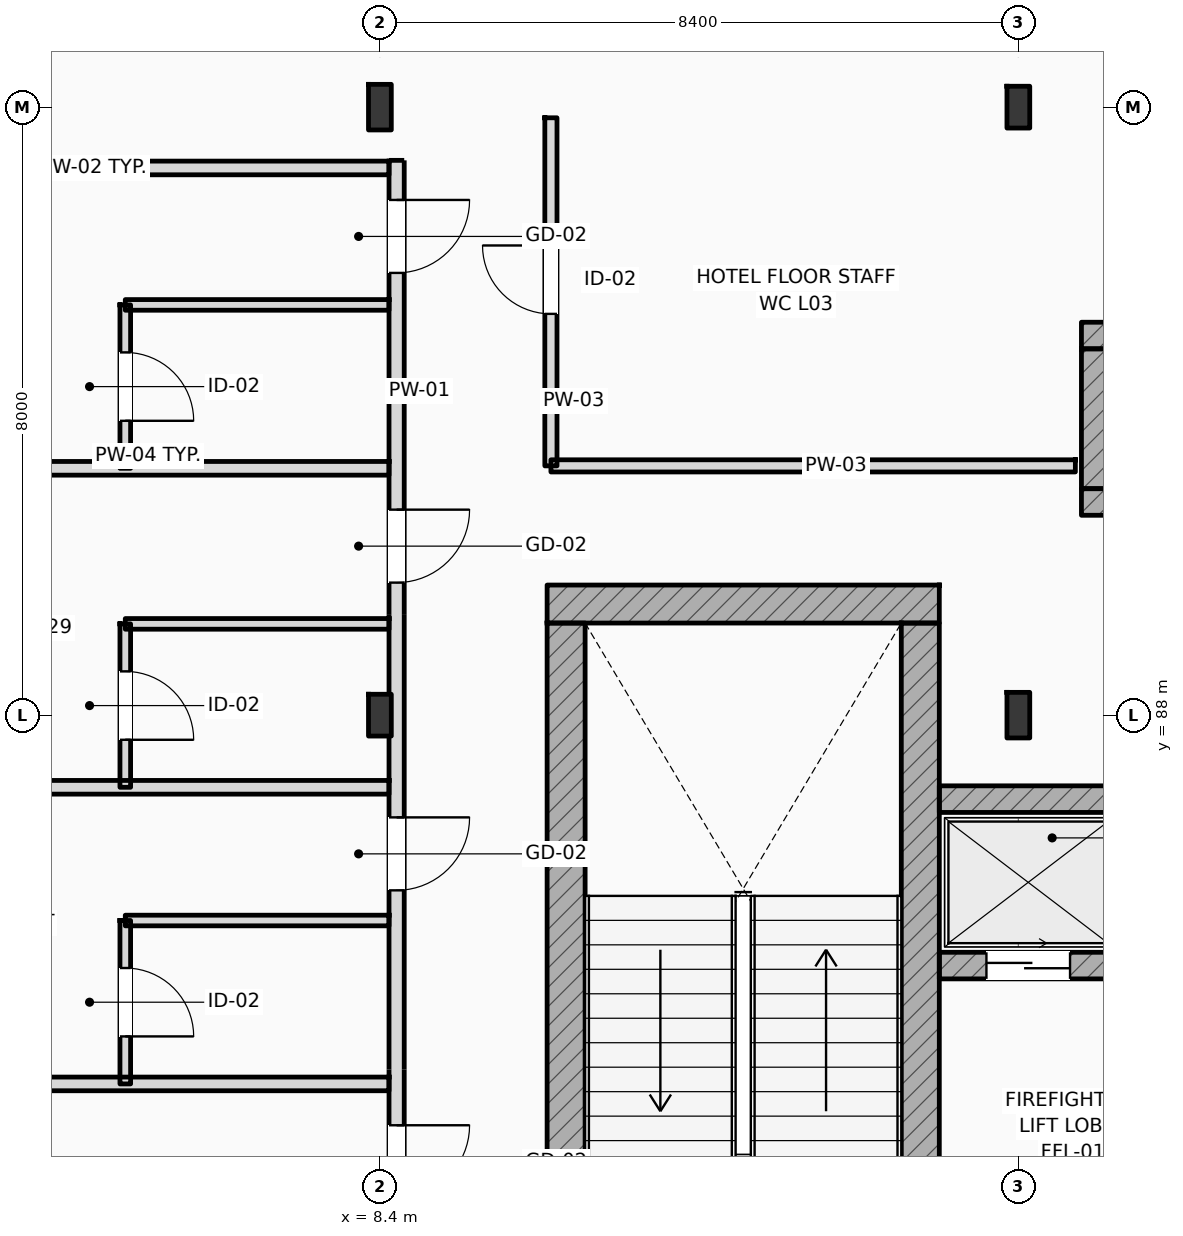
"""IFC4 building model, lengths in metres.
Left out: names, types, materials, properties, quantities, classifications, styles, units other than length and angle.
Written with IfcOpenShell. Run it as: python <this file> out.ifc"""

import sys

from ifc_helpers import new_model, si_unit, direction, frame, frame_2d, origin, origin_2d, place, context, subcontext, project, spatial, rectangle, i_section, extrude, element, fill, save


model = new_model("IFC4")
c1 = context("Model", 3, precision=1e-05, world=origin(), true_north=direction((0.0, 1.0)))
c2 = subcontext(c1, "Body", "Model", "MODEL_VIEW")
j1 = project(units=[si_unit("LENGTHUNIT", "METRE"), si_unit("PLANEANGLEUNIT", "RADIAN")], contexts=[c1])
p1 = place(None, origin())
s1 = spatial("IfcSite", under=j1, at=p1, CompositionType="ELEMENT")
p2 = place(p1, origin())
s2 = spatial("IfcBuilding", under=s1, at=p2, CompositionType="ELEMENT")
p3 = place(p2, frame((0.0, 0.0, 16.2)))
s3 = spatial("IfcBuildingStorey", under=s2, at=p3, CompositionType="ELEMENT", Elevation=16.2)
p4 = place(p3, frame((8.4, 88.0, 0.0), z_axis=(0.0, 0.0, 1.0), x_axis=(1.0, 0.0, 0.0)))
e1 = element("IfcColumn", 1, at=p4, inside=s3, PredefinedType="COLUMN", context=c2, shape_type="SweptSolid", body=[
    extrude(i_section(OverallWidth=0.3, OverallDepth=0.55, WebThickness=0.015, FlangeThickness=0.029, FilletRadius=0.027, at=origin_2d()), origin(), (0.0, 0.0, 1.0), 4.2),
])
for number, where, z_axis, x_axis in (
    (2, (8.4, 96.0, 0.0), (0.0, 0.0, 1.0), (1.0, 0.0, 0.0)),
    (3, (16.8, 88.0, 0.0), (0.0, 0.0, 1.0), (1.0, 0.0, 0.0)),
):
    element("IfcColumn", number, at=place(p3, frame(where, z_axis=z_axis, x_axis=x_axis)), inside=s3, PredefinedType="COLUMN", context=c2, shape_type="SweptSolid", body=[
        extrude(i_section(OverallWidth=0.3, OverallDepth=0.6, WebThickness=0.015, FlangeThickness=0.03, FilletRadius=0.027, at=origin_2d()), origin(), (0.0, 0.0, 1.0), 4.2),
    ])
p5 = place(p3, frame((16.8, 96.0, 0.0), z_axis=(0.0, 0.0, 1.0), x_axis=(1.0, 0.0, 0.0)))
e4 = element("IfcColumn", 4, at=p5, inside=s3, PredefinedType="COLUMN", context=c2, shape_type="SweptSolid", body=[
    extrude(i_section(OverallWidth=0.3, OverallDepth=0.55, WebThickness=0.015, FlangeThickness=0.029, FilletRadius=0.027, at=origin_2d()), origin(), (0.0, 0.0, 1.0), 4.2),
])
p6 = place(p3, frame((10.6, 89.462, 0.0), z_axis=(0.0, 0.0, 1.0), x_axis=(1.0, 0.0, 0.0)))
e5 = element("IfcWall", 5, at=p6, inside=s3, PredefinedType="SHEAR", context=c2, shape_type="SweptSolid", body=[
    extrude(rectangle(XDim=5.16, YDim=0.5, at=frame_2d((2.58, 0.0))), origin(), (0.0, 0.0, 1.0), 4.2),
])
p7 = place(p3, frame((10.85, 80.1, 0.0), z_axis=(0.0, 0.0, 1.0), x_axis=(0.0, 1.0, 0.0)))
e6 = element("IfcWall", 6, at=p7, inside=s3, PredefinedType="SHEAR", context=c2, shape_type="SweptSolid", body=[
    extrude(rectangle(XDim=9.112, YDim=0.5, at=frame_2d((4.556, 0.0))), origin(), (0.0, 0.0, 1.0), 4.2),
])
p8 = place(p3, frame((15.51, 80.1, 0.0), z_axis=(0.0, 0.0, 1.0), x_axis=(0.0, 1.0, 0.0)))
e7 = element("IfcWall", 7, at=p8, inside=s3, PredefinedType="SHEAR", context=c2, shape_type="SweptSolid", body=[
    extrude(rectangle(XDim=9.112, YDim=0.5, at=frame_2d((4.556, 0.0))), origin(), (0.0, 0.0, 1.0), 4.2),
])
p9 = place(p8, frame((0.44, 0.0, 0.0)))
e8 = element("IfcOpeningElement", 8, at=p9, cuts=e7, PredefinedType="OPENING", context=c2, shape_type="SweptSolid", body=[
    extrude(rectangle(XDim=1.1, YDim=2.2, at=frame_2d((0.55, 1.1))), frame((0.0, 0.26, 0.0), z_axis=(0.0, -1.0, 0.0), x_axis=(1.0, 0.0, 0.0)), (0.0, 0.0, 1.0), 0.52),
])
p10 = place(p3, frame((15.76, 86.895, 0.0), z_axis=(0.0, 0.0, 1.0), x_axis=(1.0, 0.0, 0.0)))
e9 = element("IfcWall", 9, at=p10, inside=s3, PredefinedType="SHEAR", context=c2, shape_type="SweptSolid", body=[
    extrude(rectangle(XDim=2.69, YDim=0.35, at=frame_2d((1.345, 0.0))), origin(), (0.0, 0.0, 1.0), 3.92),
])
p11 = place(p3, frame((15.76, 84.705, 0.0), z_axis=(0.0, 0.0, 1.0), x_axis=(1.0, 0.0, 0.0)))
e10 = element("IfcWall", 10, at=p11, inside=s3, PredefinedType="SHEAR", context=c2, shape_type="SweptSolid", body=[
    extrude(rectangle(XDim=2.69, YDim=0.35, at=frame_2d((1.345, 0.0))), origin(), (0.0, 0.0, 1.0), 3.92),
])
p12 = place(p11, frame((0.62, 0.0, 0.0)))
e11 = element("IfcOpeningElement", 11, at=p12, cuts=e10, PredefinedType="OPENING", context=c2, shape_type="SweptSolid", body=[
    extrude(rectangle(XDim=1.1, YDim=2.2, at=frame_2d((0.55, 1.1))), frame((0.0, 0.185, 0.0), z_axis=(0.0, -1.0, 0.0), x_axis=(1.0, 0.0, 0.0)), (0.0, 0.0, 1.0), 0.37),
])
p13 = place(p3, frame((17.63, 92.995, 0.0), z_axis=(0.0, 0.0, 1.0), x_axis=(1.0, 0.0, 0.0)))
e12 = element("IfcWall", 12, at=p13, inside=s3, PredefinedType="SHEAR", context=c2, shape_type="SweptSolid", body=[
    extrude(rectangle(XDim=3.34, YDim=0.35, at=frame_2d((1.67, 0.0))), origin(), (0.0, 0.0, 1.0), 3.92),
])
p14 = place(p3, frame((17.63, 90.805, 0.0), z_axis=(0.0, 0.0, 1.0), x_axis=(1.0, 0.0, 0.0)))
e13 = element("IfcWall", 13, at=p14, inside=s3, PredefinedType="SHEAR", context=c2, shape_type="SweptSolid", body=[
    extrude(rectangle(XDim=3.34, YDim=0.35, at=frame_2d((1.67, 0.0))), origin(), (0.0, 0.0, 1.0), 3.92),
])
p15 = place(p14, frame((1.045, 0.0, 0.0)))
e14 = element("IfcOpeningElement", 14, at=p15, cuts=e13, PredefinedType="OPENING", context=c2, shape_type="SweptSolid", body=[
    extrude(rectangle(XDim=1.25, YDim=2.25, at=frame_2d((0.625, 1.125))), frame((0.0, 0.185, 0.0), z_axis=(0.0, -1.0, 0.0), x_axis=(1.0, 0.0, 0.0)), (0.0, 0.0, 1.0), 0.37),
])
p16 = place(p3, frame((17.805, 90.98, 0.0), z_axis=(0.0, 0.0, 1.0), x_axis=(0.0, 1.0, 0.0)))
e15 = element("IfcWall", 15, at=p16, inside=s3, PredefinedType="SHEAR", context=c2, shape_type="SweptSolid", body=[
    extrude(rectangle(XDim=1.84, YDim=0.35, at=frame_2d((0.92, 0.0))), origin(), (0.0, 0.0, 1.0), 3.92),
])
p17 = place(p3, frame((8.62, 62.64, 0.0), z_axis=(0.0, 0.0, 1.0), x_axis=(0.0, 1.0, 0.0)))
e16 = element("IfcWall", 16, at=p17, inside=s3, PredefinedType="PARTITIONING", context=c2, shape_type="SweptSolid", body=[
    extrude(rectangle(XDim=32.66, YDim=0.2, at=frame_2d((16.33, 0.0))), origin(), (0.0, 0.0, 1.0), 3.51),
])
p18 = place(p17, frame((2.829, 0.0, 0.0)))
e17 = element("IfcOpeningElement", 17, at=p18, cuts=e16, PredefinedType="OPENING", context=c2, shape_type="SweptSolid", body=[
    extrude(rectangle(XDim=0.96, YDim=2.2, at=frame_2d((0.48, 1.1))), frame((0.0, 0.11, 0.0), z_axis=(0.0, -1.0, 0.0), x_axis=(1.0, 0.0, 0.0)), (0.0, 0.0, 1.0), 0.22),
])
p19 = place(p17, frame((4.704, 0.0, 0.0)))
e18 = element("IfcOpeningElement", 18, at=p19, cuts=e16, PredefinedType="OPENING", context=c2, shape_type="SweptSolid", body=[
    extrude(rectangle(XDim=0.96, YDim=2.2, at=frame_2d((0.48, 1.1))), frame((0.0, 0.11, 0.0), z_axis=(0.0, -1.0, 0.0), x_axis=(1.0, 0.0, 0.0)), (0.0, 0.0, 1.0), 0.22),
])
p20 = place(p17, frame((10.905, 0.0, 0.0)))
e19 = element("IfcOpeningElement", 19, at=p20, cuts=e16, PredefinedType="OPENING", context=c2, shape_type="SweptSolid", body=[
    extrude(rectangle(XDim=0.96, YDim=2.2, at=frame_2d((0.48, 1.1))), frame((0.0, 0.11, 0.0), z_axis=(0.0, -1.0, 0.0), x_axis=(1.0, 0.0, 0.0)), (0.0, 0.0, 1.0), 0.22),
])
p21 = place(p17, frame((14.954, 0.0, 0.0)))
e20 = element("IfcOpeningElement", 20, at=p21, cuts=e16, PredefinedType="OPENING", context=c2, shape_type="SweptSolid", body=[
    extrude(rectangle(XDim=0.96, YDim=2.2, at=frame_2d((0.48, 1.1))), frame((0.0, 0.11, 0.0), z_axis=(0.0, -1.0, 0.0), x_axis=(1.0, 0.0, 0.0)), (0.0, 0.0, 1.0), 0.22),
])
p22 = place(p17, frame((19.004, 0.0, 0.0)))
e21 = element("IfcOpeningElement", 21, at=p22, cuts=e16, PredefinedType="OPENING", context=c2, shape_type="SweptSolid", body=[
    extrude(rectangle(XDim=0.96, YDim=2.2, at=frame_2d((0.48, 1.1))), frame((0.0, 0.11, 0.0), z_axis=(0.0, -1.0, 0.0), x_axis=(1.0, 0.0, 0.0)), (0.0, 0.0, 1.0), 0.22),
])
p23 = place(p17, frame((23.055, 0.0, 0.0)))
e22 = element("IfcOpeningElement", 22, at=p23, cuts=e16, PredefinedType="OPENING", context=c2, shape_type="SweptSolid", body=[
    extrude(rectangle(XDim=0.96, YDim=2.2, at=frame_2d((0.48, 1.1))), frame((0.0, 0.11, 0.0), z_axis=(0.0, -1.0, 0.0), x_axis=(1.0, 0.0, 0.0)), (0.0, 0.0, 1.0), 0.22),
])
p24 = place(p17, frame((27.104, 0.0, 0.0)))
e23 = element("IfcOpeningElement", 23, at=p24, cuts=e16, PredefinedType="OPENING", context=c2, shape_type="SweptSolid", body=[
    extrude(rectangle(XDim=0.96, YDim=2.2, at=frame_2d((0.48, 1.1))), frame((0.0, 0.11, 0.0), z_axis=(0.0, -1.0, 0.0), x_axis=(1.0, 0.0, 0.0)), (0.0, 0.0, 1.0), 0.22),
])
p25 = place(p17, frame((31.179, 0.0, 0.0)))
e24 = element("IfcOpeningElement", 24, at=p25, cuts=e16, PredefinedType="OPENING", context=c2, shape_type="SweptSolid", body=[
    extrude(rectangle(XDim=0.96, YDim=2.2, at=frame_2d((0.48, 1.1))), frame((0.0, 0.11, 0.0), z_axis=(0.0, -1.0, 0.0), x_axis=(1.0, 0.0, 0.0)), (0.0, 0.0, 1.0), 0.22),
])
p26 = place(p3, frame((10.65, 91.28, 0.0), z_axis=(0.0, 0.0, 1.0), x_axis=(0.0, 1.0, 0.0)))
e25 = element("IfcWall", 25, at=p26, inside=s3, PredefinedType="PARTITIONING", context=c2, shape_type="SweptSolid", body=[
    extrude(rectangle(XDim=4.58, YDim=0.16, at=frame_2d((2.29, 0.0))), origin(), (0.0, 0.0, 1.0), 3.92),
])
p27 = place(p26, frame((2.0, 0.0, 0.0)))
e26 = element("IfcOpeningElement", 26, at=p27, cuts=e25, PredefinedType="OPENING", context=c2, shape_type="SweptSolid", body=[
    extrude(rectangle(XDim=0.9, YDim=2.1, at=frame_2d((0.45, 1.05))), frame((0.0, 0.09, 0.0), z_axis=(0.0, -1.0, 0.0), x_axis=(1.0, 0.0, 0.0)), (0.0, 0.0, 1.0), 0.18),
])
p28 = place(p3, frame((10.65, 91.28, 0.0), z_axis=(0.0, 0.0, 1.0), x_axis=(1.0, 0.0, 0.0)))
e27 = element("IfcWall", 27, at=p28, inside=s3, PredefinedType="PARTITIONING", context=c2, shape_type="SweptSolid", body=[
    extrude(rectangle(XDim=6.9, YDim=0.16, at=frame_2d((3.45, 0.0))), origin(), (0.0, 0.0, 1.0), 3.92),
])
for number, where, z_axis, x_axis in (
    (28, (0.15, 83.148, 0.0), (0.0, 0.0, 1.0), (1.0, 0.0, 0.0)),
    (29, (0.15, 87.051, 0.0), (0.0, 0.0, 1.0), (1.0, 0.0, 0.0)),
):
    element("IfcWall", number, at=place(p3, frame(where, z_axis=z_axis, x_axis=x_axis)), inside=s3, PredefinedType="PARTITIONING", context=c2, shape_type="SweptSolid", body=[
        extrude(rectangle(XDim=8.37, YDim=0.18, at=frame_2d((4.185, 0.0))), origin(), (0.0, 0.0, 1.0), 3.92),
    ])
p29 = place(p3, frame((5.05, 85.298, 0.0), z_axis=(0.0, 0.0, 1.0), x_axis=(1.0, 0.0, 0.0)))
e30 = element("IfcWall", 30, at=p29, inside=s3, PredefinedType="PARTITIONING", context=c2, shape_type="SweptSolid", body=[
    extrude(rectangle(XDim=3.47, YDim=0.14, at=frame_2d((1.735, 0.0))), origin(), (0.0, 0.0, 1.0), 3.92),
])
p30 = place(p3, frame((5.05, 83.148, 0.0), z_axis=(0.0, 0.0, 1.0), x_axis=(0.0, 1.0, 0.0)))
e31 = element("IfcWall", 31, at=p30, inside=s3, PredefinedType="PARTITIONING", context=c2, shape_type="SweptSolid", body=[
    extrude(rectangle(XDim=2.15, YDim=0.14, at=frame_2d((1.075, 0.0))), origin(), (0.0, 0.0, 1.0), 3.92),
])
p31 = place(p30, frame((0.625, 0.0, 0.0)))
e32 = element("IfcOpeningElement", 32, at=p31, cuts=e31, PredefinedType="OPENING", context=c2, shape_type="SweptSolid", body=[
    extrude(rectangle(XDim=0.9, YDim=2.1, at=frame_2d((0.45, 1.05))), frame((0.0, 0.08, 0.0), z_axis=(0.0, -1.0, 0.0), x_axis=(1.0, 0.0, 0.0)), (0.0, 0.0, 1.0), 0.16),
])
p32 = place(p3, frame((0.15, 91.248, 0.0), z_axis=(0.0, 0.0, 1.0), x_axis=(1.0, 0.0, 0.0)))
e33 = element("IfcWall", 33, at=p32, inside=s3, PredefinedType="PARTITIONING", context=c2, shape_type="SweptSolid", body=[
    extrude(rectangle(XDim=8.37, YDim=0.18, at=frame_2d((4.185, 0.0))), origin(), (0.0, 0.0, 1.0), 3.92),
])
p33 = place(p3, frame((5.05, 89.201, 0.0), z_axis=(0.0, 0.0, 1.0), x_axis=(1.0, 0.0, 0.0)))
e34 = element("IfcWall", 34, at=p33, inside=s3, PredefinedType="PARTITIONING", context=c2, shape_type="SweptSolid", body=[
    extrude(rectangle(XDim=3.47, YDim=0.14, at=frame_2d((1.735, 0.0))), origin(), (0.0, 0.0, 1.0), 3.92),
])
p34 = place(p3, frame((5.05, 87.051, 0.0), z_axis=(0.0, 0.0, 1.0), x_axis=(0.0, 1.0, 0.0)))
e35 = element("IfcWall", 35, at=p34, inside=s3, PredefinedType="PARTITIONING", context=c2, shape_type="SweptSolid", body=[
    extrude(rectangle(XDim=2.15, YDim=0.14, at=frame_2d((1.075, 0.0))), origin(), (0.0, 0.0, 1.0), 3.92),
])
p35 = place(p34, frame((0.625, 0.0, 0.0)))
e36 = element("IfcOpeningElement", 36, at=p35, cuts=e35, PredefinedType="OPENING", context=c2, shape_type="SweptSolid", body=[
    extrude(rectangle(XDim=0.9, YDim=2.1, at=frame_2d((0.45, 1.05))), frame((0.0, 0.08, 0.0), z_axis=(0.0, -1.0, 0.0), x_axis=(1.0, 0.0, 0.0)), (0.0, 0.0, 1.0), 0.16),
])
p36 = place(p3, frame((0.15, 95.2, 0.0), z_axis=(0.0, 0.0, 1.0), x_axis=(1.0, 0.0, 0.0)))
e37 = element("IfcWall", 37, at=p36, inside=s3, PredefinedType="PARTITIONING", context=c2, shape_type="SweptSolid", body=[
    extrude(rectangle(XDim=8.37, YDim=0.18, at=frame_2d((4.185, 0.0))), origin(), (0.0, 0.0, 1.0), 3.92),
])
p37 = place(p3, frame((5.05, 93.398, 0.0), z_axis=(0.0, 0.0, 1.0), x_axis=(1.0, 0.0, 0.0)))
e38 = element("IfcWall", 38, at=p37, inside=s3, PredefinedType="PARTITIONING", context=c2, shape_type="SweptSolid", body=[
    extrude(rectangle(XDim=3.47, YDim=0.14, at=frame_2d((1.735, 0.0))), origin(), (0.0, 0.0, 1.0), 3.92),
])
p38 = place(p3, frame((5.05, 91.248, 0.0), z_axis=(0.0, 0.0, 1.0), x_axis=(0.0, 1.0, 0.0)))
e39 = element("IfcWall", 39, at=p38, inside=s3, PredefinedType="PARTITIONING", context=c2, shape_type="SweptSolid", body=[
    extrude(rectangle(XDim=2.15, YDim=0.14, at=frame_2d((1.075, 0.0))), origin(), (0.0, 0.0, 1.0), 3.92),
])
p39 = place(p38, frame((0.625, 0.0, 0.0)))
e40 = element("IfcOpeningElement", 40, at=p39, cuts=e39, PredefinedType="OPENING", context=c2, shape_type="SweptSolid", body=[
    extrude(rectangle(XDim=0.9, YDim=2.1, at=frame_2d((0.45, 1.05))), frame((0.0, 0.08, 0.0), z_axis=(0.0, -1.0, 0.0), x_axis=(1.0, 0.0, 0.0)), (0.0, 0.0, 1.0), 0.16),
])
p40 = place(p12, origin())
e41 = element("IfcDoor", 41, at=p40, inside=s3, OperationType="SLIDING_TO_LEFT", PredefinedType="DOOR", context=c2, shape_type="SweptSolid", body=[
    extrude(rectangle(XDim=1.1, YDim=2.2, at=frame_2d((0.55, 1.1))), frame((0.0, 0.025, 0.0), z_axis=(0.0, -1.0, 0.0), x_axis=(1.0, 0.0, 0.0)), (0.0, 0.0, 1.0), 0.05),
])
fill(e11, e41)
p41 = place(p22, frame((0.96, 0.0, 0.0), z_axis=(0.0, 0.0, 1.0), x_axis=(-1.0, 0.0, 0.0)))
e42 = element("IfcDoor", 42, at=p41, inside=s3, OperationType="SINGLE_SWING_RIGHT", PredefinedType="DOOR", context=c2, shape_type="SweptSolid", body=[
    extrude(rectangle(XDim=0.96, YDim=2.2, at=frame_2d((0.48, 1.1))), frame((0.0, 0.025, 0.0), z_axis=(0.0, -1.0, 0.0), x_axis=(1.0, 0.0, 0.0)), (0.0, 0.0, 1.0), 0.05),
])
fill(e21, e42)
p42 = place(p23, frame((0.96, 0.0, 0.0), z_axis=(0.0, 0.0, 1.0), x_axis=(-1.0, 0.0, 0.0)))
e43 = element("IfcDoor", 43, at=p42, inside=s3, OperationType="SINGLE_SWING_RIGHT", PredefinedType="DOOR", context=c2, shape_type="SweptSolid", body=[
    extrude(rectangle(XDim=0.96, YDim=2.2, at=frame_2d((0.48, 1.1))), frame((0.0, 0.025, 0.0), z_axis=(0.0, -1.0, 0.0), x_axis=(1.0, 0.0, 0.0)), (0.0, 0.0, 1.0), 0.05),
])
fill(e22, e43)
p43 = place(p31, frame((0.9, 0.0, 0.0), z_axis=(0.0, 0.0, 1.0), x_axis=(-1.0, 0.0, 0.0)))
e44 = element("IfcDoor", 44, at=p43, inside=s3, OperationType="SINGLE_SWING_LEFT", PredefinedType="DOOR", context=c2, shape_type="SweptSolid", body=[
    extrude(rectangle(XDim=0.9, YDim=2.1, at=frame_2d((0.45, 1.05))), frame((0.0, 0.025, 0.0), z_axis=(0.0, -1.0, 0.0), x_axis=(1.0, 0.0, 0.0)), (0.0, 0.0, 1.0), 0.05),
])
fill(e32, e44)
p44 = place(p24, frame((0.96, 0.0, 0.0), z_axis=(0.0, 0.0, 1.0), x_axis=(-1.0, 0.0, 0.0)))
e45 = element("IfcDoor", 45, at=p44, inside=s3, OperationType="SINGLE_SWING_RIGHT", PredefinedType="DOOR", context=c2, shape_type="SweptSolid", body=[
    extrude(rectangle(XDim=0.96, YDim=2.2, at=frame_2d((0.48, 1.1))), frame((0.0, 0.025, 0.0), z_axis=(0.0, -1.0, 0.0), x_axis=(1.0, 0.0, 0.0)), (0.0, 0.0, 1.0), 0.05),
])
fill(e23, e45)
p45 = place(p35, frame((0.9, 0.0, 0.0), z_axis=(0.0, 0.0, 1.0), x_axis=(-1.0, 0.0, 0.0)))
e46 = element("IfcDoor", 46, at=p45, inside=s3, OperationType="SINGLE_SWING_LEFT", PredefinedType="DOOR", context=c2, shape_type="SweptSolid", body=[
    extrude(rectangle(XDim=0.9, YDim=2.1, at=frame_2d((0.45, 1.05))), frame((0.0, 0.025, 0.0), z_axis=(0.0, -1.0, 0.0), x_axis=(1.0, 0.0, 0.0)), (0.0, 0.0, 1.0), 0.05),
])
fill(e36, e46)
p46 = place(p25, frame((0.96, 0.0, 0.0), z_axis=(0.0, 0.0, 1.0), x_axis=(-1.0, 0.0, 0.0)))
e47 = element("IfcDoor", 47, at=p46, inside=s3, OperationType="SINGLE_SWING_RIGHT", PredefinedType="DOOR", context=c2, shape_type="SweptSolid", body=[
    extrude(rectangle(XDim=0.96, YDim=2.2, at=frame_2d((0.48, 1.1))), frame((0.0, 0.025, 0.0), z_axis=(0.0, -1.0, 0.0), x_axis=(1.0, 0.0, 0.0)), (0.0, 0.0, 1.0), 0.05),
])
fill(e24, e47)
p47 = place(p39, frame((0.9, 0.0, 0.0), z_axis=(0.0, 0.0, 1.0), x_axis=(-1.0, 0.0, 0.0)))
e48 = element("IfcDoor", 48, at=p47, inside=s3, OperationType="SINGLE_SWING_LEFT", PredefinedType="DOOR", context=c2, shape_type="SweptSolid", body=[
    extrude(rectangle(XDim=0.9, YDim=2.1, at=frame_2d((0.45, 1.05))), frame((0.0, 0.025, 0.0), z_axis=(0.0, -1.0, 0.0), x_axis=(1.0, 0.0, 0.0)), (0.0, 0.0, 1.0), 0.05),
])
fill(e40, e48)
p48 = place(p27, origin())
e49 = element("IfcDoor", 49, at=p48, inside=s3, OperationType="SINGLE_SWING_RIGHT", PredefinedType="DOOR", context=c2, shape_type="SweptSolid", body=[
    extrude(rectangle(XDim=0.9, YDim=2.1, at=frame_2d((0.45, 1.05))), frame((0.0, 0.025, 0.0), z_axis=(0.0, -1.0, 0.0), x_axis=(1.0, 0.0, 0.0)), (0.0, 0.0, 1.0), 0.05),
])
fill(e26, e49)
save(model, sys.argv[1])
